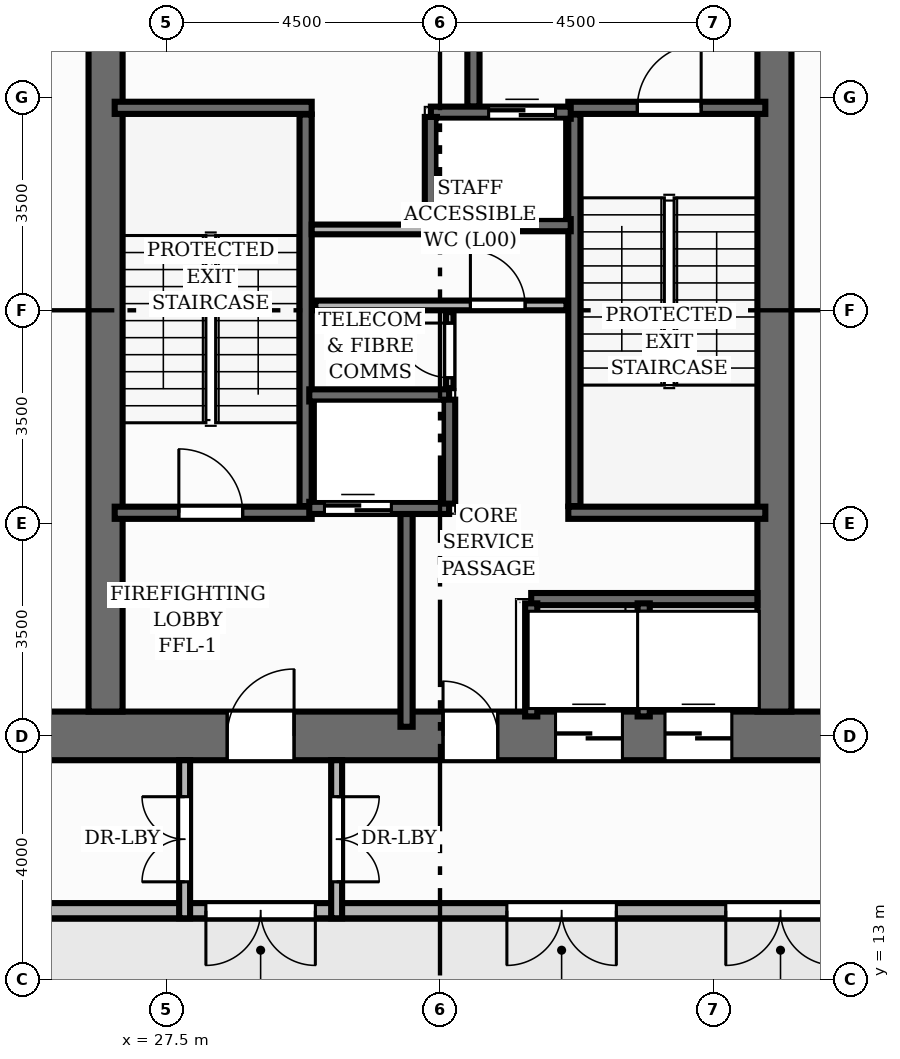
"""IFC4 building model, lengths in metres.
Left out: names, types, materials, properties, quantities, classifications, styles, units other than length and angle.
Written with IfcOpenShell. Run it as: python <this file> out.ifc"""

import sys

from ifc_helpers import new_model, si_unit, direction, frame, frame_2d, origin, place, context, subcontext, project, spatial, rectangle, extrude, element, fill, save


model = new_model("IFC4")
c1 = context("Model", 3, precision=1e-05, world=origin(), true_north=direction((0.0, 1.0)))
c2 = subcontext(c1, "Body", "Model", "MODEL_VIEW")
j1 = project(units=[si_unit("LENGTHUNIT", "METRE"), si_unit("PLANEANGLEUNIT", "RADIAN")], contexts=[c1])
p1 = place(None, origin())
s1 = spatial("IfcSite", under=j1, at=p1, CompositionType="ELEMENT")
p2 = place(p1, origin())
s2 = spatial("IfcBuilding", under=s1, at=p2, CompositionType="ELEMENT")
p3 = place(p2, origin())
s3 = spatial("IfcBuildingStorey", under=s2, at=p3, CompositionType="ELEMENT", Elevation=0.0)
p4 = place(p3, frame((22.6, 17.0, 0.0), z_axis=(0.0, 0.0, 1.0), x_axis=(1.0, 0.0, 0.0)))
e1 = element("IfcWall", 1, at=p4, inside=s3, PredefinedType="SHEAR", context=c2, shape_type="SweptSolid", body=[
    extrude(rectangle(XDim=18.8, YDim=0.8, at=frame_2d((9.4, 0.0))), origin(), (0.0, 0.0, 1.0), 4.0),
])
p5 = place(p4, frame((5.9, 0.0, 0.0)))
e2 = element("IfcOpeningElement", 2, at=p5, cuts=e1, PredefinedType="OPENING", context=c2, shape_type="SweptSolid", body=[
    extrude(rectangle(XDim=1.1, YDim=2.15, at=frame_2d((0.55, 1.075))), frame((0.0, 0.41, 0.0), z_axis=(0.0, -1.0, 0.0), x_axis=(1.0, 0.0, 0.0)), (0.0, 0.0, 1.0), 0.82),
])
p6 = place(p4, frame((11.3, 0.0, 0.0)))
e3 = element("IfcOpeningElement", 3, at=p6, cuts=e1, PredefinedType="OPENING", context=c2, shape_type="SweptSolid", body=[
    extrude(rectangle(XDim=1.1, YDim=2.15, at=frame_2d((0.55, 1.075))), frame((0.0, 0.41, 0.0), z_axis=(0.0, -1.0, 0.0), x_axis=(1.0, 0.0, 0.0)), (0.0, 0.0, 1.0), 0.82),
])
p7 = place(p4, frame((13.1, 0.0, 0.0)))
e4 = element("IfcOpeningElement", 4, at=p7, cuts=e1, PredefinedType="OPENING", context=c2, shape_type="SweptSolid", body=[
    extrude(rectangle(XDim=1.1, YDim=2.15, at=frame_2d((0.55, 1.075))), frame((0.0, 0.41, 0.0), z_axis=(0.0, -1.0, 0.0), x_axis=(1.0, 0.0, 0.0)), (0.0, 0.0, 1.0), 0.82),
])
p8 = place(p4, frame((9.45, 0.0, 0.0)))
e5 = element("IfcOpeningElement", 5, at=p8, cuts=e1, PredefinedType="OPENING", context=c2, shape_type="SweptSolid", body=[
    extrude(rectangle(XDim=0.9, YDim=2.1, at=frame_2d((0.45, 1.05))), frame((0.0, 0.41, 0.0), z_axis=(0.0, -1.0, 0.0), x_axis=(1.0, 0.0, 0.0)), (0.0, 0.0, 1.0), 0.82),
])
for number, where, z_axis, x_axis in (
    (6, (26.5, 17.4, 0.0), (0.0, 0.0, 1.0), (0.0, 1.0, 0.0)),
    (7, (37.5, 17.4, 0.0), (0.0, 0.0, 1.0), (0.0, 1.0, 0.0)),
):
    element("IfcWall", number, at=place(p3, frame(where, z_axis=z_axis, x_axis=x_axis)), inside=s3, PredefinedType="SHEAR", context=c2, shape_type="SweptSolid", body=[
        extrude(rectangle(XDim=13.2, YDim=0.56, at=frame_2d((6.6, 0.0))), origin(), (0.0, 0.0, 1.0), 4.0),
    ])
p9 = place(p3, frame((41.1, 14.125, 0.0), z_axis=(0.0, 0.0, 1.0), x_axis=(-1.0, 0.0, 0.0)))
e8 = element("IfcWall", 8, at=p9, inside=s3, PredefinedType="SOLIDWALL", context=c2, shape_type="SweptSolid", body=[
    extrude(rectangle(XDim=18.2, YDim=0.25, at=frame_2d((9.1, 0.0))), origin(), (0.0, 0.0, 1.0), 3.72),
])
p10 = place(p9, frame((11.15, 0.0, 0.0)))
e9 = element("IfcOpeningElement", 9, at=p10, cuts=e8, PredefinedType="OPENING", context=c2, shape_type="SweptSolid", body=[
    extrude(rectangle(XDim=1.8, YDim=2.3, at=frame_2d((0.9, 1.15))), frame((0.0, 0.135, 0.0), z_axis=(0.0, -1.0, 0.0), x_axis=(1.0, 0.0, 0.0)), (0.0, 0.0, 1.0), 0.27),
])
p11 = place(p9, frame((2.6, 0.0, 0.0)))
e10 = element("IfcOpeningElement", 10, at=p11, cuts=e8, PredefinedType="OPENING", context=c2, shape_type="SweptSolid", body=[
    extrude(rectangle(XDim=1.8, YDim=2.3, at=frame_2d((0.9, 1.15))), frame((0.0, 0.135, 0.0), z_axis=(0.0, -1.0, 0.0), x_axis=(1.0, 0.0, 0.0)), (0.0, 0.0, 1.0), 0.27),
])
p12 = place(p9, frame((6.2, 0.0, 0.0)))
e11 = element("IfcOpeningElement", 11, at=p12, cuts=e8, PredefinedType="OPENING", context=c2, shape_type="SweptSolid", body=[
    extrude(rectangle(XDim=1.8, YDim=2.3, at=frame_2d((0.9, 1.15))), frame((0.0, 0.135, 0.0), z_axis=(0.0, -1.0, 0.0), x_axis=(1.0, 0.0, 0.0)), (0.0, 0.0, 1.0), 0.27),
])
p13 = place(p3, frame((29.79, 20.78, 0.0), z_axis=(0.0, 0.0, 1.0), x_axis=(0.0, 1.0, 0.0)))
e12 = element("IfcWall", 12, at=p13, inside=s3, PredefinedType="SHEAR", context=c2, shape_type="SweptSolid", body=[
    extrude(rectangle(XDim=6.44, YDim=0.2, at=frame_2d((3.22, 0.0))), origin(), (0.0, 0.0, 1.0), 4.0),
])
p14 = place(p3, frame((26.65, 27.33, 0.0), z_axis=(0.0, 0.0, 1.0), x_axis=(1.0, 0.0, 0.0)))
e13 = element("IfcWall", 13, at=p14, inside=s3, PredefinedType="SHEAR", context=c2, shape_type="SweptSolid", body=[
    extrude(rectangle(XDim=3.24, YDim=0.2, at=frame_2d((1.62, 0.0))), origin(), (0.0, 0.0, 1.0), 4.0),
])
p15 = place(p3, frame((26.65, 20.67, 0.0), z_axis=(0.0, 0.0, 1.0), x_axis=(1.0, 0.0, 0.0)))
e14 = element("IfcWall", 14, at=p15, inside=s3, PredefinedType="SHEAR", context=c2, shape_type="SweptSolid", body=[
    extrude(rectangle(XDim=3.24, YDim=0.2, at=frame_2d((1.62, 0.0))), origin(), (0.0, 0.0, 1.0), 4.0),
])
p16 = place(p15, frame((1.055, 0.0, 0.0)))
e15 = element("IfcOpeningElement", 15, at=p16, cuts=e14, PredefinedType="OPENING", context=c2, shape_type="SweptSolid", body=[
    extrude(rectangle(XDim=1.05, YDim=2.15, at=frame_2d((0.525, 1.075))), frame((0.0, 0.11, 0.0), z_axis=(0.0, -1.0, 0.0), x_axis=(1.0, 0.0, 0.0)), (0.0, 0.0, 1.0), 0.22),
])
p17 = place(p3, frame((34.21, 20.78, 0.0), z_axis=(0.0, 0.0, 1.0), x_axis=(0.0, 1.0, 0.0)))
e16 = element("IfcWall", 16, at=p17, inside=s3, PredefinedType="SHEAR", context=c2, shape_type="SweptSolid", body=[
    extrude(rectangle(XDim=6.44, YDim=0.2, at=frame_2d((3.22, 0.0))), origin(), (0.0, 0.0, 1.0), 4.0),
])
p18 = place(p3, frame((34.11, 20.67, 0.0), z_axis=(0.0, 0.0, 1.0), x_axis=(1.0, 0.0, 0.0)))
e17 = element("IfcWall", 17, at=p18, inside=s3, PredefinedType="SHEAR", context=c2, shape_type="SweptSolid", body=[
    extrude(rectangle(XDim=3.24, YDim=0.2, at=frame_2d((1.62, 0.0))), origin(), (0.0, 0.0, 1.0), 4.0),
])
p19 = place(p3, frame((34.11, 27.33, 0.0), z_axis=(0.0, 0.0, 1.0), x_axis=(1.0, 0.0, 0.0)))
e18 = element("IfcWall", 18, at=p19, inside=s3, PredefinedType="SHEAR", context=c2, shape_type="SweptSolid", body=[
    extrude(rectangle(XDim=3.24, YDim=0.2, at=frame_2d((1.62, 0.0))), origin(), (0.0, 0.0, 1.0), 4.0),
])
p20 = place(p19, frame((1.135, 0.0, 0.0)))
e19 = element("IfcOpeningElement", 19, at=p20, cuts=e18, PredefinedType="OPENING", context=c2, shape_type="SweptSolid", body=[
    extrude(rectangle(XDim=1.05, YDim=2.15, at=frame_2d((0.525, 1.075))), frame((0.0, 0.11, 0.0), z_axis=(0.0, -1.0, 0.0), x_axis=(1.0, 0.0, 0.0)), (0.0, 0.0, 1.0), 0.22),
])
for number, where, z_axis, x_axis in (
    (20, (31.45, 17.15, 0.0), (0.0, 0.0, 1.0), (0.0, 1.0, 0.0)),
    (21, (32.55, 27.35, 0.0), (0.0, 0.0, 1.0), (0.0, 1.0, 0.0)),
):
    element("IfcWall", number, at=place(p3, frame(where, z_axis=z_axis, x_axis=x_axis)), inside=s3, PredefinedType="SHEAR", context=c2, shape_type="SweptSolid", body=[
        extrude(rectangle(XDim=3.5, YDim=0.2, at=frame_2d((1.75, 0.0))), origin(), (0.0, 0.0, 1.0), 4.0),
    ])
p21 = place(p3, frame((29.85, 20.75, 0.0), z_axis=(0.0, 0.0, 1.0), x_axis=(1.0, 0.0, 0.0)))
e22 = element("IfcWall", 22, at=p21, inside=s3, PredefinedType="SHEAR", context=c2, shape_type="SweptSolid", body=[
    extrude(rectangle(XDim=2.3, YDim=0.2, at=frame_2d((1.15, 0.0))), origin(), (0.0, 0.0, 1.0), 4.0),
])
p22 = place(p21, frame((0.25, 0.0, 0.0)))
e23 = element("IfcOpeningElement", 23, at=p22, cuts=e22, PredefinedType="OPENING", context=c2, shape_type="SweptSolid", body=[
    extrude(rectangle(XDim=1.1, YDim=2.15, at=frame_2d((0.55, 1.075))), frame((0.0, 0.11, 0.0), z_axis=(0.0, -1.0, 0.0), x_axis=(1.0, 0.0, 0.0)), (0.0, 0.0, 1.0), 0.22),
])
p23 = place(p3, frame((29.85, 22.6, 0.0), z_axis=(0.0, 0.0, 1.0), x_axis=(1.0, 0.0, 0.0)))
e24 = element("IfcWall", 24, at=p23, inside=s3, PredefinedType="SHEAR", context=c2, shape_type="SweptSolid", body=[
    extrude(rectangle(XDim=2.3, YDim=0.2, at=frame_2d((1.15, 0.0))), origin(), (0.0, 0.0, 1.0), 4.0),
])
p24 = place(p3, frame((32.15, 20.82, 0.0), z_axis=(0.0, 0.0, 1.0), x_axis=(0.0, 1.0, 0.0)))
e25 = element("IfcWall", 25, at=p24, inside=s3, PredefinedType="SHEAR", context=c2, shape_type="SweptSolid", body=[
    extrude(rectangle(XDim=1.71, YDim=0.2, at=frame_2d((0.855, 0.0))), origin(), (0.0, 0.0, 1.0), 4.0),
])
p25 = place(p3, frame((31.85, 27.25, 0.0), z_axis=(0.0, 0.0, 1.0), x_axis=(1.0, 0.0, 0.0)))
e26 = element("IfcWall", 26, at=p25, inside=s3, PredefinedType="SHEAR", context=c2, shape_type="SweptSolid", body=[
    extrude(rectangle(XDim=2.3, YDim=0.2, at=frame_2d((1.15, 0.0))), origin(), (0.0, 0.0, 1.0), 4.0),
])
p26 = place(p25, frame((0.95, 0.0, 0.0)))
e27 = element("IfcOpeningElement", 27, at=p26, cuts=e26, PredefinedType="OPENING", context=c2, shape_type="SweptSolid", body=[
    extrude(rectangle(XDim=1.1, YDim=2.15, at=frame_2d((0.55, 1.075))), frame((0.0, 0.11, 0.0), z_axis=(0.0, -1.0, 0.0), x_axis=(1.0, 0.0, 0.0)), (0.0, 0.0, 1.0), 0.22),
])
p27 = place(p3, frame((31.85, 25.4, 0.0), z_axis=(0.0, 0.0, 1.0), x_axis=(1.0, 0.0, 0.0)))
e28 = element("IfcWall", 28, at=p27, inside=s3, PredefinedType="SHEAR", context=c2, shape_type="SweptSolid", body=[
    extrude(rectangle(XDim=2.3, YDim=0.2, at=frame_2d((1.15, 0.0))), origin(), (0.0, 0.0, 1.0), 4.0),
])
p28 = place(p3, frame((31.85, 25.47, 0.0), z_axis=(0.0, 0.0, 1.0), x_axis=(0.0, 1.0, 0.0)))
e29 = element("IfcWall", 29, at=p28, inside=s3, PredefinedType="SHEAR", context=c2, shape_type="SweptSolid", body=[
    extrude(rectangle(XDim=1.71, YDim=0.2, at=frame_2d((0.855, 0.0))), origin(), (0.0, 0.0, 1.0), 4.0),
])
p29 = place(p3, frame((33.5, 19.25, 0.0), z_axis=(0.0, 0.0, 1.0), x_axis=(1.0, 0.0, 0.0)))
e30 = element("IfcWall", 30, at=p29, inside=s3, PredefinedType="SHEAR", context=c2, shape_type="SweptSolid", body=[
    extrude(rectangle(XDim=3.72, YDim=0.2, at=frame_2d((1.86, 0.0))), origin(), (0.0, 0.0, 1.0), 4.0),
])
for number, where, z_axis, x_axis in (
    (31, (33.5, 17.32, 0.0), (0.0, 0.0, 1.0), (0.0, 1.0, 0.0)),
    (32, (35.35, 17.32, 0.0), (0.0, 0.0, 1.0), (0.0, 1.0, 0.0)),
):
    element("IfcWall", number, at=place(p3, frame(where, z_axis=z_axis, x_axis=x_axis)), inside=s3, PredefinedType="SHEAR", context=c2, shape_type="SweptSolid", body=[
        extrude(rectangle(XDim=1.86, YDim=0.2, at=frame_2d((0.93, 0.0))), origin(), (0.0, 0.0, 1.0), 4.0),
    ])
p30 = place(p3, frame((29.95, 24.08, 0.0), z_axis=(0.0, 0.0, 1.0), x_axis=(1.0, 0.0, 0.0)))
e33 = element("IfcWall", 33, at=p30, inside=s3, PredefinedType="PLUMBINGWALL", context=c2, shape_type="SweptSolid", body=[
    extrude(rectangle(XDim=4.13, YDim=0.16, at=frame_2d((2.065, 0.0))), origin(), (0.0, 0.0, 1.0), 3.715),
])
p31 = place(p30, frame((2.55, 0.0, 0.0)))
e34 = element("IfcOpeningElement", 34, at=p31, cuts=e33, PredefinedType="OPENING", context=c2, shape_type="SweptSolid", body=[
    extrude(rectangle(XDim=0.9, YDim=2.1, at=frame_2d((0.45, 1.05))), frame((0.0, 0.09, 0.0), z_axis=(0.0, -1.0, 0.0), x_axis=(1.0, 0.0, 0.0)), (0.0, 0.0, 1.0), 0.18),
])
p32 = place(p3, frame((32.16, 22.72, 0.0), z_axis=(0.0, 0.0, 1.0), x_axis=(0.0, 1.0, 0.0)))
e35 = element("IfcWall", 35, at=p32, inside=s3, PredefinedType="PARTITIONING", context=c2, shape_type="SweptSolid", body=[
    extrude(rectangle(XDim=1.25, YDim=0.125, at=frame_2d((0.625, 0.0))), origin(), (0.0, 0.0, 1.0), 3.715),
])
p33 = place(p32, frame((0.17, 0.0, 0.0)))
e36 = element("IfcOpeningElement", 36, at=p33, cuts=e35, PredefinedType="OPENING", context=c2, shape_type="SweptSolid", body=[
    extrude(rectangle(XDim=0.9, YDim=2.1, at=frame_2d((0.45, 1.05))), frame((0.0, 0.073, 0.0), z_axis=(0.0, -1.0, 0.0), x_axis=(1.0, 0.0, 0.0)), (0.0, 0.0, 1.0), 0.145),
])
p34 = place(p3, frame((29.89, 25.33, 0.0), z_axis=(0.0, 0.0, 1.0), x_axis=(1.0, 0.0, 0.0)))
e37 = element("IfcWall", 37, at=p34, inside=s3, PredefinedType="PLUMBINGWALL", context=c2, shape_type="SweptSolid", body=[
    extrude(rectangle(XDim=1.94, YDim=0.16, at=frame_2d((0.97, 0.0))), origin(), (0.0, 0.0, 1.0), 3.715),
])
p35 = place(p3, frame((30.3, 16.6, 0.0), z_axis=(0.0, 0.0, 1.0), x_axis=(0.0, -1.0, 0.0)))
e38 = element("IfcWall", 38, at=p35, inside=s3, PredefinedType="PARTITIONING", context=c2, shape_type="SweptSolid", body=[
    extrude(rectangle(XDim=2.6, YDim=0.18, at=frame_2d((1.3, 0.0))), origin(), (0.0, 0.0, 1.0), 3.715),
])
p36 = place(p35, frame((0.6, 0.0, 0.0)))
e39 = element("IfcOpeningElement", 39, at=p36, cuts=e38, PredefinedType="OPENING", context=c2, shape_type="SweptSolid", body=[
    extrude(rectangle(XDim=1.4, YDim=2.15, at=frame_2d((0.7, 1.075))), frame((0.0, 0.1, 0.0), z_axis=(0.0, -1.0, 0.0), x_axis=(1.0, 0.0, 0.0)), (0.0, 0.0, 1.0), 0.2),
])
p37 = place(p3, frame((27.8, 14.0, 0.0), z_axis=(0.0, 0.0, 1.0), x_axis=(0.0, 1.0, 0.0)))
e40 = element("IfcWall", 40, at=p37, inside=s3, PredefinedType="PARTITIONING", context=c2, shape_type="SweptSolid", body=[
    extrude(rectangle(XDim=2.6, YDim=0.18, at=frame_2d((1.3, 0.0))), origin(), (0.0, 0.0, 1.0), 3.715),
])
p38 = place(p37, frame((0.6, 0.0, 0.0)))
e41 = element("IfcOpeningElement", 41, at=p38, cuts=e40, PredefinedType="OPENING", context=c2, shape_type="SweptSolid", body=[
    extrude(rectangle(XDim=1.4, YDim=2.15, at=frame_2d((0.7, 1.075))), frame((0.0, 0.1, 0.0), z_axis=(0.0, -1.0, 0.0), x_axis=(1.0, 0.0, 0.0)), (0.0, 0.0, 1.0), 0.2),
])
p39 = place(p10, origin())
e42 = element("IfcDoor", 42, at=p39, inside=s3, OperationType="DOUBLE_DOOR_SINGLE_SWING", PredefinedType="DOOR", context=c2, shape_type="SweptSolid", body=[
    extrude(rectangle(XDim=1.8, YDim=2.3, at=frame_2d((0.9, 1.15))), frame((0.0, 0.025, 0.0), z_axis=(0.0, -1.0, 0.0), x_axis=(1.0, 0.0, 0.0)), (0.0, 0.0, 1.0), 0.05),
])
fill(e9, e42)
p40 = place(p11, origin())
e43 = element("IfcDoor", 43, at=p40, inside=s3, OperationType="DOUBLE_DOOR_SINGLE_SWING", PredefinedType="DOOR", context=c2, shape_type="SweptSolid", body=[
    extrude(rectangle(XDim=1.8, YDim=2.3, at=frame_2d((0.9, 1.15))), frame((0.0, 0.025, 0.0), z_axis=(0.0, -1.0, 0.0), x_axis=(1.0, 0.0, 0.0)), (0.0, 0.0, 1.0), 0.05),
])
fill(e10, e43)
p41 = place(p12, origin())
e44 = element("IfcDoor", 44, at=p41, inside=s3, OperationType="DOUBLE_DOOR_SINGLE_SWING", PredefinedType="DOOR", context=c2, shape_type="SweptSolid", body=[
    extrude(rectangle(XDim=1.8, YDim=2.3, at=frame_2d((0.9, 1.15))), frame((0.0, 0.025, 0.0), z_axis=(0.0, -1.0, 0.0), x_axis=(1.0, 0.0, 0.0)), (0.0, 0.0, 1.0), 0.05),
])
fill(e11, e44)
p42 = place(p16, origin())
e45 = element("IfcDoor", 45, at=p42, inside=s3, OperationType="SINGLE_SWING_LEFT", PredefinedType="DOOR", context=c2, shape_type="SweptSolid", body=[
    extrude(rectangle(XDim=1.05, YDim=2.15, at=frame_2d((0.525, 1.075))), frame((0.0, 0.025, 0.0), z_axis=(0.0, -1.0, 0.0), x_axis=(1.0, 0.0, 0.0)), (0.0, 0.0, 1.0), 0.05),
])
fill(e15, e45)
p43 = place(p20, origin())
e46 = element("IfcDoor", 46, at=p43, inside=s3, OperationType="SINGLE_SWING_RIGHT", PredefinedType="DOOR", context=c2, shape_type="SweptSolid", body=[
    extrude(rectangle(XDim=1.05, YDim=2.15, at=frame_2d((0.525, 1.075))), frame((0.0, 0.025, 0.0), z_axis=(0.0, -1.0, 0.0), x_axis=(1.0, 0.0, 0.0)), (0.0, 0.0, 1.0), 0.05),
])
fill(e19, e46)
p44 = place(p5, origin())
e47 = element("IfcDoor", 47, at=p44, inside=s3, OperationType="SINGLE_SWING_RIGHT", PredefinedType="DOOR", context=c2, shape_type="SweptSolid", body=[
    extrude(rectangle(XDim=1.1, YDim=2.15, at=frame_2d((0.55, 1.075))), frame((0.0, 0.025, 0.0), z_axis=(0.0, -1.0, 0.0), x_axis=(1.0, 0.0, 0.0)), (0.0, 0.0, 1.0), 0.05),
])
fill(e2, e47)
p45 = place(p22, origin())
e48 = element("IfcDoor", 48, at=p45, inside=s3, OperationType="DOUBLE_DOOR_SLIDING", PredefinedType="DOOR", context=c2, shape_type="SweptSolid", body=[
    extrude(rectangle(XDim=1.1, YDim=2.15, at=frame_2d((0.55, 1.075))), frame((0.0, 0.025, 0.0), z_axis=(0.0, -1.0, 0.0), x_axis=(1.0, 0.0, 0.0)), (0.0, 0.0, 1.0), 0.05),
])
fill(e23, e48)
p46 = place(p26, origin())
e49 = element("IfcDoor", 49, at=p46, inside=s3, OperationType="DOUBLE_DOOR_SLIDING", PredefinedType="DOOR", context=c2, shape_type="SweptSolid", body=[
    extrude(rectangle(XDim=1.1, YDim=2.15, at=frame_2d((0.55, 1.075))), frame((0.0, 0.025, 0.0), z_axis=(0.0, -1.0, 0.0), x_axis=(1.0, 0.0, 0.0)), (0.0, 0.0, 1.0), 0.05),
])
fill(e27, e49)
p47 = place(p6, origin())
e50 = element("IfcDoor", 50, at=p47, inside=s3, OperationType="DOUBLE_DOOR_SLIDING", PredefinedType="DOOR", context=c2, shape_type="SweptSolid", body=[
    extrude(rectangle(XDim=1.1, YDim=2.15, at=frame_2d((0.55, 1.075))), frame((0.0, 0.025, 0.0), z_axis=(0.0, -1.0, 0.0), x_axis=(1.0, 0.0, 0.0)), (0.0, 0.0, 1.0), 0.05),
])
fill(e3, e50)
p48 = place(p7, origin())
e51 = element("IfcDoor", 51, at=p48, inside=s3, OperationType="DOUBLE_DOOR_SLIDING", PredefinedType="DOOR", context=c2, shape_type="SweptSolid", body=[
    extrude(rectangle(XDim=1.1, YDim=2.15, at=frame_2d((0.55, 1.075))), frame((0.0, 0.025, 0.0), z_axis=(0.0, -1.0, 0.0), x_axis=(1.0, 0.0, 0.0)), (0.0, 0.0, 1.0), 0.05),
])
fill(e4, e51)
p49 = place(p8, origin())
e52 = element("IfcDoor", 52, at=p49, inside=s3, OperationType="SINGLE_SWING_LEFT", PredefinedType="DOOR", context=c2, shape_type="SweptSolid", body=[
    extrude(rectangle(XDim=0.9, YDim=2.1, at=frame_2d((0.45, 1.05))), frame((0.0, 0.025, 0.0), z_axis=(0.0, -1.0, 0.0), x_axis=(1.0, 0.0, 0.0)), (0.0, 0.0, 1.0), 0.05),
])
fill(e5, e52)
p50 = place(p31, origin())
e53 = element("IfcDoor", 53, at=p50, inside=s3, OperationType="SINGLE_SWING_LEFT", PredefinedType="DOOR", context=c2, shape_type="SweptSolid", body=[
    extrude(rectangle(XDim=0.9, YDim=2.1, at=frame_2d((0.45, 1.05))), frame((0.0, 0.025, 0.0), z_axis=(0.0, -1.0, 0.0), x_axis=(1.0, 0.0, 0.0)), (0.0, 0.0, 1.0), 0.05),
])
fill(e34, e53)
p51 = place(p33, origin())
e54 = element("IfcDoor", 54, at=p51, inside=s3, OperationType="SINGLE_SWING_RIGHT", PredefinedType="DOOR", context=c2, shape_type="SweptSolid", body=[
    extrude(rectangle(XDim=0.9, YDim=2.1, at=frame_2d((0.45, 1.05))), frame((0.0, 0.025, 0.0), z_axis=(0.0, -1.0, 0.0), x_axis=(1.0, 0.0, 0.0)), (0.0, 0.0, 1.0), 0.05),
])
fill(e36, e54)
p52 = place(p36, origin())
e55 = element("IfcDoor", 55, at=p52, inside=s3, OperationType="DOUBLE_DOOR_SINGLE_SWING", PredefinedType="DOOR", context=c2, shape_type="SweptSolid", body=[
    extrude(rectangle(XDim=1.4, YDim=2.15, at=frame_2d((0.7, 1.075))), frame((0.0, 0.025, 0.0), z_axis=(0.0, -1.0, 0.0), x_axis=(1.0, 0.0, 0.0)), (0.0, 0.0, 1.0), 0.05),
])
fill(e39, e55)
p53 = place(p38, origin())
e56 = element("IfcDoor", 56, at=p53, inside=s3, OperationType="DOUBLE_DOOR_SINGLE_SWING", PredefinedType="DOOR", context=c2, shape_type="SweptSolid", body=[
    extrude(rectangle(XDim=1.4, YDim=2.15, at=frame_2d((0.7, 1.075))), frame((0.0, 0.025, 0.0), z_axis=(0.0, -1.0, 0.0), x_axis=(1.0, 0.0, 0.0)), (0.0, 0.0, 1.0), 0.05),
])
fill(e41, e56)
save(model, sys.argv[1])
